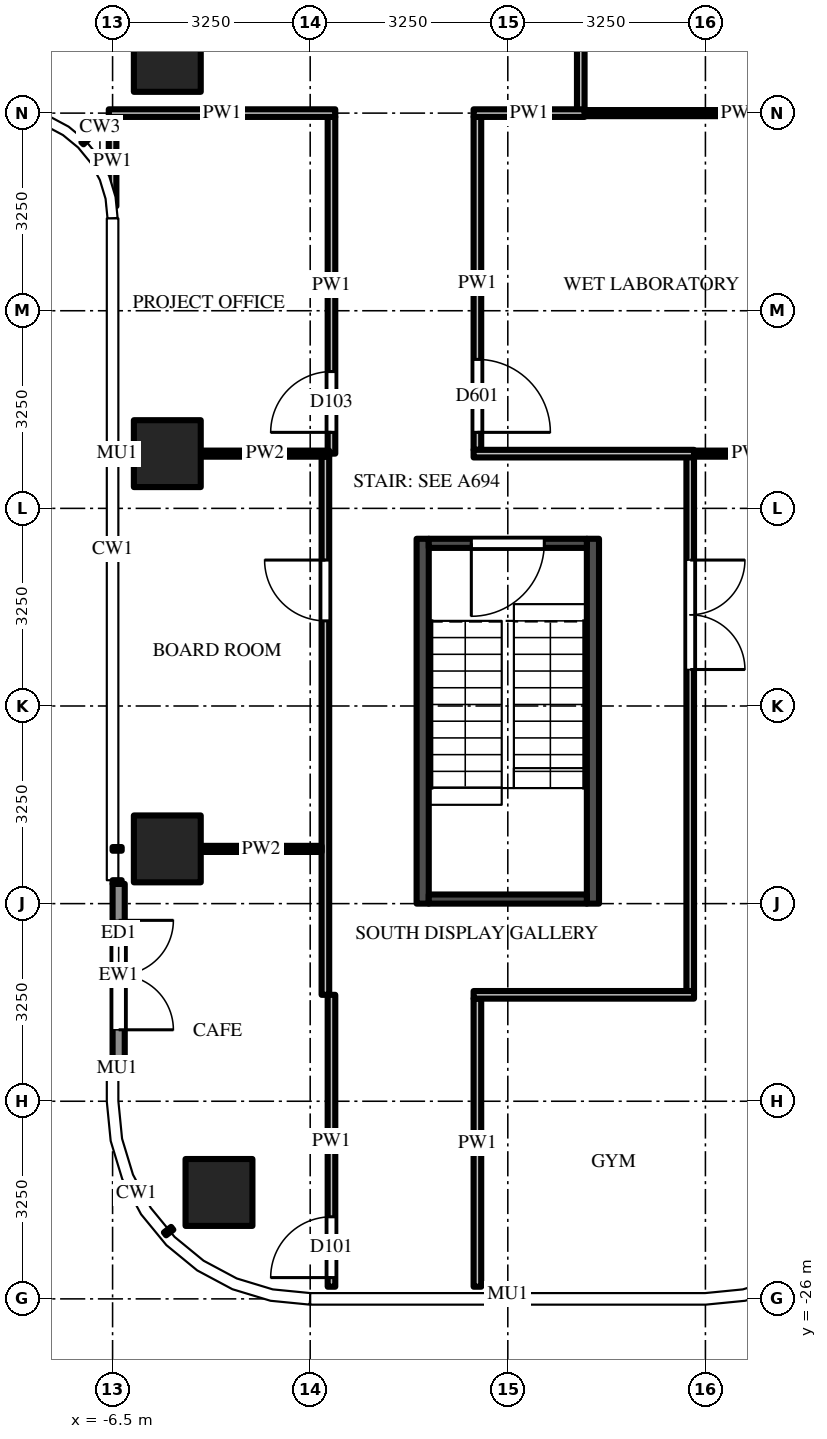
"""IFC4 building model, lengths in metres.
Left out: names, types, materials, properties, quantities, classifications, styles, units other than length and angle.
Written with IfcOpenShell. Run it as: python <this file> out.ifc"""

import sys

from ifc_helpers import new_model, si_unit, direction, frame, frame_2d, origin, origin_2d, place, context, subcontext, project, spatial, rectangle, extrude, source, transform, mapped, element, fill, save


model = new_model("IFC4")
c1 = context("Model", 3, precision=1e-05, world=origin(), true_north=direction((0.0, 1.0)))
c2 = subcontext(c1, "Body", "Model", "MODEL_VIEW")
j1 = project(units=[si_unit("LENGTHUNIT", "METRE"), si_unit("PLANEANGLEUNIT", "RADIAN")], contexts=[c1])
p1 = place(None, origin())
s1 = spatial("IfcSite", under=j1, at=p1, CompositionType="ELEMENT")
p2 = place(p1, origin())
s2 = spatial("IfcBuilding", under=s1, at=p2, CompositionType="ELEMENT")
p3 = place(p2, frame((0.0, 0.0, 240.2)))
s3 = spatial("IfcBuildingStorey", under=s2, at=p3, CompositionType="ELEMENT", Elevation=240.2)
m1 = source(origin(), c2, "Body", "SweptSolid", [
    extrude(rectangle(XDim=1.1, YDim=1.1, at=origin_2d()), origin(), (0.0, 0.0, 1.0), 3.9),
])
for number, where, z_axis, x_axis in (
    (1, (-5.6, -5.6, 0.0), (0.0, 0.0, 1.0), (1.0, 0.0, 0.0)),
    (2, (-5.6, -12.1, 0.0), (0.0, 0.0, 1.0), (1.0, 0.0, 0.0)),
    (3, (-5.6, -18.6, 0.0), (0.0, 0.0, 1.0), (1.0, 0.0, 0.0)),
    (4, (-4.75, -24.25, 0.0), (0.0, 0.0, 1.0), (1.0, 0.0, 0.0)),
):
    element("IfcColumn", number, at=place(p3, frame(where, z_axis=z_axis, x_axis=x_axis)), inside=s3, PredefinedType="COLUMN", context=c2, shape_type="MappedRepresentation", body=[
        mapped(m1, transform((0.0, 0.0, 0.0))),
    ])
m2 = source(origin(), c2, "Body", "SweptSolid", [
    extrude(rectangle(XDim=6.0, YDim=0.2, at=frame_2d((3.0, 0.0))), origin(), (0.0, 0.0, 1.0), 3.7),
])
for number, where, z_axis, x_axis in (
    (5, (1.4, -13.5, 0.0), (0.0, 0.0, 1.0), (0.0, -1.0, 0.0)),
    (6, (-1.4, -13.5, 0.0), (0.0, 0.0, 1.0), (0.0, -1.0, 0.0)),
):
    element("IfcWall", number, at=place(p3, frame(where, z_axis=z_axis, x_axis=x_axis)), inside=s3, PredefinedType="SHEAR", context=c2, shape_type="MappedRepresentation", body=[
        mapped(m2, transform((0.0, 0.0, 0.0))),
    ])
m3 = source(origin(), c2, "Body", "SweptSolid", [
    extrude(rectangle(XDim=2.6, YDim=0.15, at=frame_2d((1.3, 0.0))), origin(), (0.0, 0.0, 1.0), 3.7),
])
p4 = place(p3, frame((1.3, -13.575, 0.0), z_axis=(0.0, 0.0, 1.0), x_axis=(-1.0, 0.0, 0.0)))
e7 = element("IfcWall", 7, at=p4, inside=s3, PredefinedType="SHEAR", context=c2, shape_type="MappedRepresentation", body=[
    mapped(m3, transform((0.0, 0.0, 0.0))),
])
m4 = source(origin(), c2, "Body", "SweptSolid", [
    extrude(rectangle(XDim=1.2, YDim=2.1, at=frame_2d((0.6, 1.05))), frame((0.0, 0.085, 0.0), z_axis=(0.0, -1.0, 0.0), x_axis=(1.0, 0.0, 0.0)), (0.0, 0.0, 1.0), 0.17),
])
p5 = place(p4, frame((0.7, 0.0, 0.0)))
e8 = element("IfcOpeningElement", 8, at=p5, cuts=e7, PredefinedType="OPENING", context=c2, shape_type="MappedRepresentation", body=[
    mapped(m4, transform((0.0, 0.0, 0.0))),
])
p6 = place(p3, frame((1.3, -19.425, 0.0), z_axis=(0.0, 0.0, 1.0), x_axis=(-1.0, 0.0, 0.0)))
e9 = element("IfcWall", 9, at=p6, inside=s3, PredefinedType="SHEAR", context=c2, shape_type="MappedRepresentation", body=[
    mapped(m3, transform((0.0, 0.0, 0.0))),
])
m5 = source(origin(), c2, "Body", "SweptSolid", [
    extrude(rectangle(XDim=3.0, YDim=0.2, at=frame_2d((1.5, 0.0))), origin(), (0.0, 0.0, 1.0), 3.7),
])
p7 = place(p3, frame((-6.4, -19.175, 0.0), z_axis=(0.0, 0.0, 1.0), x_axis=(0.0, -1.0, 0.0)))
e10 = element("IfcWall", 10, at=p7, inside=s3, PredefinedType="SOLIDWALL", context=c2, shape_type="MappedRepresentation", body=[
    mapped(m5, transform((0.0, 0.0, 0.0))),
])
m6 = source(origin(), c2, "Body", "SweptSolid", [
    extrude(rectangle(XDim=1.8, YDim=2.4, at=frame_2d((0.9, 1.2))), frame((0.0, 0.11, 0.0), z_axis=(0.0, -1.0, 0.0), x_axis=(1.0, 0.0, 0.0)), (0.0, 0.0, 1.0), 0.22),
])
p8 = place(p7, frame((0.6, 0.0, 0.0)))
e11 = element("IfcOpeningElement", 11, at=p8, cuts=e10, PredefinedType="OPENING", context=c2, shape_type="MappedRepresentation", body=[
    mapped(m6, transform((0.0, 0.0, 0.0))),
])
m7 = source(origin(), c2, "Body", "SweptSolid", [
    extrude(rectangle(XDim=1.469, YDim=0.125, at=frame_2d((0.734, 0.0))), origin(), (0.0, 0.0, 1.0), 3.7),
])
p9 = place(p3, frame((-6.5, -6.562, 0.0), z_axis=(0.0, 0.0, 1.0), x_axis=(0.0, -1.0, 0.0)))
e12 = element("IfcWall", 12, at=p9, inside=s3, PredefinedType="PARTITIONING", context=c2, shape_type="MappedRepresentation", body=[
    mapped(m7, transform((0.0, 0.0, 0.0))),
])
m8 = source(origin(), c2, "Body", "SweptSolid", [
    extrude(rectangle(XDim=8.85, YDim=0.125, at=frame_2d((4.425, 0.0))), origin(), (0.0, 0.0, 1.0), 2.997),
])
p10 = place(p3, frame((-3.0, -21.0, 0.0), z_axis=(0.0, 0.0, 1.0), x_axis=(0.0, 1.0, 0.0)))
e13 = element("IfcWall", 13, at=p10, inside=s3, PredefinedType="PARTITIONING", context=c2, shape_type="MappedRepresentation", body=[
    mapped(m8, transform((0.0, 0.0, 0.0))),
])
m9 = source(origin(), c2, "Body", "SweptSolid", [
    extrude(rectangle(XDim=1.0, YDim=2.1, at=frame_2d((0.5, 1.05))), frame((0.0, 0.073, 0.0), z_axis=(0.0, -1.0, 0.0), x_axis=(1.0, 0.0, 0.0)), (0.0, 0.0, 1.0), 0.145),
])
p11 = place(p10, frame((6.15, 0.0, 0.0)))
e14 = element("IfcOpeningElement", 14, at=p11, cuts=e13, PredefinedType="OPENING", context=c2, shape_type="MappedRepresentation", body=[
    mapped(m9, transform((0.0, 0.0, 0.0))),
])
m10 = source(origin(), c2, "Body", "SweptSolid", [
    extrude(rectangle(XDim=4.8, YDim=0.125, at=frame_2d((2.4, 0.0))), origin(), (0.0, 0.0, 1.0), 2.78),
])
p12 = place(p3, frame((-2.9, -25.8, 0.0), z_axis=(0.0, 0.0, 1.0), x_axis=(0.0, 1.0, 0.0)))
e15 = element("IfcWall", 15, at=p12, inside=s3, PredefinedType="PARTITIONING", context=c2, shape_type="MappedRepresentation", body=[
    mapped(m10, transform((0.0, 0.0, 0.0))),
])
p13 = place(p12, frame((0.15, 0.0, 0.0)))
e16 = element("IfcOpeningElement", 16, at=p13, cuts=e15, PredefinedType="OPENING", context=c2, shape_type="MappedRepresentation", body=[
    mapped(m9, transform((0.0, 0.0, 0.0))),
])
m11 = source(origin(), c2, "Body", "SweptSolid", [
    extrude(rectangle(XDim=5.538, YDim=0.125, at=frame_2d((2.769, 0.0))), origin(), (0.0, 0.0, 1.0), 2.997),
])
p14 = place(p3, frame((-2.9, -12.1, 0.0), z_axis=(0.0, 0.0, 1.0), x_axis=(0.0, 1.0, 0.0)))
e17 = element("IfcWall", 17, at=p14, inside=s3, PredefinedType="PARTITIONING", context=c2, shape_type="MappedRepresentation", body=[
    mapped(m11, transform((0.0, 0.0, 0.0))),
])
p15 = place(p14, frame((0.35, 0.0, 0.0)))
e18 = element("IfcOpeningElement", 18, at=p15, cuts=e17, PredefinedType="OPENING", context=c2, shape_type="MappedRepresentation", body=[
    mapped(m9, transform((0.0, 0.0, 0.0))),
])
m12 = source(origin(), c2, "Body", "SweptSolid", [
    extrude(rectangle(XDim=4.738, YDim=0.125, at=frame_2d((2.369, 0.0))), origin(), (0.0, 0.0, 1.0), 2.78),
])
p16 = place(p3, frame((-0.5, -21.062, 0.0), z_axis=(0.0, 0.0, 1.0), x_axis=(0.0, -1.0, 0.0)))
e19 = element("IfcWall", 19, at=p16, inside=s3, PredefinedType="PARTITIONING", context=c2, shape_type="MappedRepresentation", body=[
    mapped(m12, transform((0.0, 0.0, 0.0))),
])
m13 = source(origin(), c2, "Body", "SweptSolid", [
    extrude(rectangle(XDim=5.475, YDim=0.125, at=frame_2d((2.738, 0.0))), origin(), (0.0, 0.0, 1.0), 2.997),
])
p17 = place(p3, frame((-0.5, -6.562, 0.0), z_axis=(0.0, 0.0, 1.0), x_axis=(0.0, -1.0, 0.0)))
e20 = element("IfcWall", 20, at=p17, inside=s3, PredefinedType="PARTITIONING", context=c2, shape_type="MappedRepresentation", body=[
    mapped(m13, transform((0.0, 0.0, 0.0))),
])
m14 = source(origin(), c2, "Body", "SweptSolid", [
    extrude(rectangle(XDim=1.2, YDim=2.1, at=frame_2d((0.6, 1.05))), frame((0.0, 0.073, 0.0), z_axis=(0.0, -1.0, 0.0), x_axis=(1.0, 0.0, 0.0)), (0.0, 0.0, 1.0), 0.145),
])
p18 = place(p17, frame((3.988, 0.0, 0.0)))
e21 = element("IfcOpeningElement", 21, at=p18, cuts=e20, PredefinedType="OPENING", context=c2, shape_type="MappedRepresentation", body=[
    mapped(m14, transform((0.0, 0.0, 0.0))),
])
m15 = source(origin(), c2, "Body", "SweptSolid", [
    extrude(rectangle(XDim=3.137, YDim=0.125, at=frame_2d((1.569, 0.0))), origin(), (0.0, 0.0, 1.0), 2.997),
])
p19 = place(p3, frame((1.2, -3.312, 0.0), z_axis=(0.0, 0.0, 1.0), x_axis=(0.0, -1.0, 0.0)))
e22 = element("IfcWall", 22, at=p19, inside=s3, PredefinedType="PARTITIONING", context=c2, shape_type="MappedRepresentation", body=[
    mapped(m15, transform((0.0, 0.0, 0.0))),
])
m16 = source(origin(), c2, "Body", "SweptSolid", [
    extrude(rectangle(XDim=8.788, YDim=0.125, at=frame_2d((4.394, 0.0))), origin(), (0.0, 0.0, 1.0), 2.997),
])
p20 = place(p3, frame((3.0, -12.15, 0.0), z_axis=(0.0, 0.0, 1.0), x_axis=(0.0, -1.0, 0.0)))
e23 = element("IfcWall", 23, at=p20, inside=s3, PredefinedType="PARTITIONING", context=c2, shape_type="MappedRepresentation", body=[
    mapped(m16, transform((0.0, 0.0, 0.0))),
])
m17 = source(origin(), c2, "Body", "SweptSolid", [
    extrude(rectangle(XDim=1.8, YDim=2.1, at=frame_2d((0.9, 1.05))), frame((0.0, 0.073, 0.0), z_axis=(0.0, -1.0, 0.0), x_axis=(1.0, 0.0, 0.0)), (0.0, 0.0, 1.0), 0.145),
])
p21 = place(p20, frame((1.7, 0.0, 0.0)))
e24 = element("IfcOpeningElement", 24, at=p21, cuts=e23, PredefinedType="OPENING", context=c2, shape_type="MappedRepresentation", body=[
    mapped(m17, transform((0.0, 0.0, 0.0))),
])
m18 = source(origin(), c2, "Body", "SweptSolid", [
    extrude(rectangle(XDim=3.625, YDim=0.125, at=frame_2d((1.812, 0.0))), origin(), (0.0, 0.0, 1.0), 3.7),
])
p22 = place(p3, frame((3.062, -21.0, 0.0), z_axis=(0.0, 0.0, 1.0), x_axis=(-1.0, 0.0, 0.0)))
e25 = element("IfcWall", 25, at=p22, inside=s3, PredefinedType="PARTITIONING", context=c2, shape_type="MappedRepresentation", body=[
    mapped(m18, transform((0.0, 0.0, 0.0))),
])
m19 = source(origin(), c2, "Body", "SweptSolid", [
    extrude(rectangle(XDim=1.988, YDim=0.1, at=frame_2d((0.994, 0.0))), origin(), (0.0, 0.0, 1.0), 3.223),
])
p23 = place(p3, frame((-5.05, -18.6, 0.0), z_axis=(0.0, 0.0, 1.0), x_axis=(1.0, 0.0, 0.0)))
e26 = element("IfcWall", 26, at=p23, inside=s3, PredefinedType="PARTITIONING", context=c2, shape_type="MappedRepresentation", body=[
    mapped(m19, transform((0.0, 0.0, 0.0))),
])
m20 = source(origin(), c2, "Body", "SweptSolid", [
    extrude(rectangle(XDim=2.113, YDim=0.1, at=frame_2d((1.056, 0.0))), origin(), (0.0, 0.0, 1.0), 2.997),
])
for number, where, z_axis, x_axis in (
    (27, (-5.05, -12.1, 0.0), (0.0, 0.0, 1.0), (1.0, 0.0, 0.0)),
    (28, (2.938, -12.1, 0.0), (0.0, 0.0, 1.0), (1.0, 0.0, 0.0)),
):
    element("IfcWall", number, at=place(p3, frame(where, z_axis=z_axis, x_axis=x_axis)), inside=s3, PredefinedType="PARTITIONING", context=c2, shape_type="MappedRepresentation", body=[
        mapped(m20, transform((0.0, 0.0, 0.0))),
    ])
m21 = source(origin(), c2, "Body", "SweptSolid", [
    extrude(rectangle(XDim=3.625, YDim=0.125, at=frame_2d((1.812, 0.0))), origin(), (0.0, 0.0, 1.0), 2.997),
])
p24 = place(p3, frame((-0.562, -12.1, 0.0), z_axis=(0.0, 0.0, 1.0), x_axis=(1.0, 0.0, 0.0)))
e29 = element("IfcWall", 29, at=p24, inside=s3, PredefinedType="PARTITIONING", context=c2, shape_type="MappedRepresentation", body=[
    mapped(m21, transform((0.0, 0.0, 0.0))),
])
m22 = source(origin(), c2, "Body", "SweptSolid", [
    extrude(rectangle(XDim=5.363, YDim=0.1, at=frame_2d((2.681, 0.0))), origin(), (0.0, 0.0, 1.0), 2.78),
])
p25 = place(p3, frame((1.137, -6.5, 0.0), z_axis=(0.0, 0.0, 1.0), x_axis=(1.0, 0.0, 0.0)))
e30 = element("IfcWall", 30, at=p25, inside=s3, PredefinedType="PARTITIONING", context=c2, shape_type="MappedRepresentation", body=[
    mapped(m22, transform((0.0, 0.0, 0.0))),
])
m23 = source(origin(), c2, "Body", "SweptSolid", [
    extrude(rectangle(XDim=3.725, YDim=0.125, at=frame_2d((1.863, 0.0))), origin(), (0.0, 0.0, 1.0), 2.78),
])
p26 = place(p3, frame((-2.837, -6.5, 0.0), z_axis=(0.0, 0.0, 1.0), x_axis=(-1.0, 0.0, 0.0)))
e31 = element("IfcWall", 31, at=p26, inside=s3, PredefinedType="PARTITIONING", context=c2, shape_type="MappedRepresentation", body=[
    mapped(m23, transform((0.0, 0.0, 0.0))),
])
m24 = source(origin(), c2, "Body", "SweptSolid", [
    extrude(rectangle(XDim=1.825, YDim=0.125, at=frame_2d((0.913, 0.0))), origin(), (0.0, 0.0, 1.0), 3.7),
])
p27 = place(p3, frame((1.262, -6.5, 0.0), z_axis=(0.0, 0.0, 1.0), x_axis=(-1.0, 0.0, 0.0)))
e32 = element("IfcWall", 32, at=p27, inside=s3, PredefinedType="PARTITIONING", context=c2, shape_type="MappedRepresentation", body=[
    mapped(m24, transform((0.0, 0.0, 0.0))),
])
m25 = source(origin(), c2, "Body", "SweptSolid", [
    extrude(rectangle(XDim=1.2, YDim=2.1, at=frame_2d((0.6, 1.05))), frame((0.0, 0.025, 0.0), z_axis=(0.0, -1.0, 0.0), x_axis=(1.0, 0.0, 0.0)), (0.0, 0.0, 1.0), 0.05),
])
p28 = place(p5, origin())
e33 = element("IfcDoor", 33, at=p28, inside=s3, OperationType="SINGLE_SWING_RIGHT", PredefinedType="DOOR", context=c2, shape_type="MappedRepresentation", body=[
    mapped(m25, transform((0.0, 0.0, 0.0))),
])
fill(e8, e33)
m26 = source(origin(), c2, "Body", "SweptSolid", [
    extrude(rectangle(XDim=1.8, YDim=2.4, at=frame_2d((0.9, 1.2))), frame((0.0, 0.025, 0.0), z_axis=(0.0, -1.0, 0.0), x_axis=(1.0, 0.0, 0.0)), (0.0, 0.0, 1.0), 0.05),
])
p29 = place(p8, origin())
e34 = element("IfcDoor", 34, at=p29, inside=s3, OperationType="DOUBLE_DOOR_SINGLE_SWING", PredefinedType="DOOR", context=c2, shape_type="MappedRepresentation", body=[
    mapped(m26, transform((0.0, 0.0, 0.0))),
])
fill(e11, e34)
m27 = source(origin(), c2, "Body", "SweptSolid", [
    extrude(rectangle(XDim=1.0, YDim=2.1, at=frame_2d((0.5, 1.05))), frame((0.0, 0.025, 0.0), z_axis=(0.0, -1.0, 0.0), x_axis=(1.0, 0.0, 0.0)), (0.0, 0.0, 1.0), 0.05),
])
p30 = place(p13, origin())
e35 = element("IfcDoor", 35, at=p30, inside=s3, OperationType="SINGLE_SWING_LEFT", PredefinedType="DOOR", context=c2, shape_type="MappedRepresentation", body=[
    mapped(m27, transform((0.0, 0.0, 0.0))),
])
fill(e16, e35)
m28 = source(origin(), c2, "Body", "SweptSolid", [
    extrude(rectangle(XDim=1.8, YDim=2.1, at=frame_2d((0.9, 1.05))), frame((0.0, 0.025, 0.0), z_axis=(0.0, -1.0, 0.0), x_axis=(1.0, 0.0, 0.0)), (0.0, 0.0, 1.0), 0.05),
])
p31 = place(p21, origin())
e36 = element("IfcDoor", 36, at=p31, inside=s3, OperationType="DOUBLE_DOOR_SINGLE_SWING", PredefinedType="DOOR", context=c2, shape_type="MappedRepresentation", body=[
    mapped(m28, transform((0.0, 0.0, 0.0))),
])
fill(e24, e36)
p32 = place(p11, origin())
e37 = element("IfcDoor", 37, at=p32, inside=s3, OperationType="SINGLE_SWING_RIGHT", PredefinedType="DOOR", context=c2, shape_type="MappedRepresentation", body=[
    mapped(m27, transform((0.0, 0.0, 0.0))),
])
fill(e14, e37)
p33 = place(p15, origin())
e38 = element("IfcDoor", 38, at=p33, inside=s3, OperationType="SINGLE_SWING_LEFT", PredefinedType="DOOR", context=c2, shape_type="MappedRepresentation", body=[
    mapped(m27, transform((0.0, 0.0, 0.0))),
])
fill(e18, e38)
p34 = place(p18, origin())
e39 = element("IfcDoor", 39, at=p34, inside=s3, OperationType="SINGLE_SWING_RIGHT", PredefinedType="DOOR", context=c2, shape_type="MappedRepresentation", body=[
    mapped(m25, transform((0.0, 0.0, 0.0))),
])
fill(e21, e39)
save(model, sys.argv[1])
